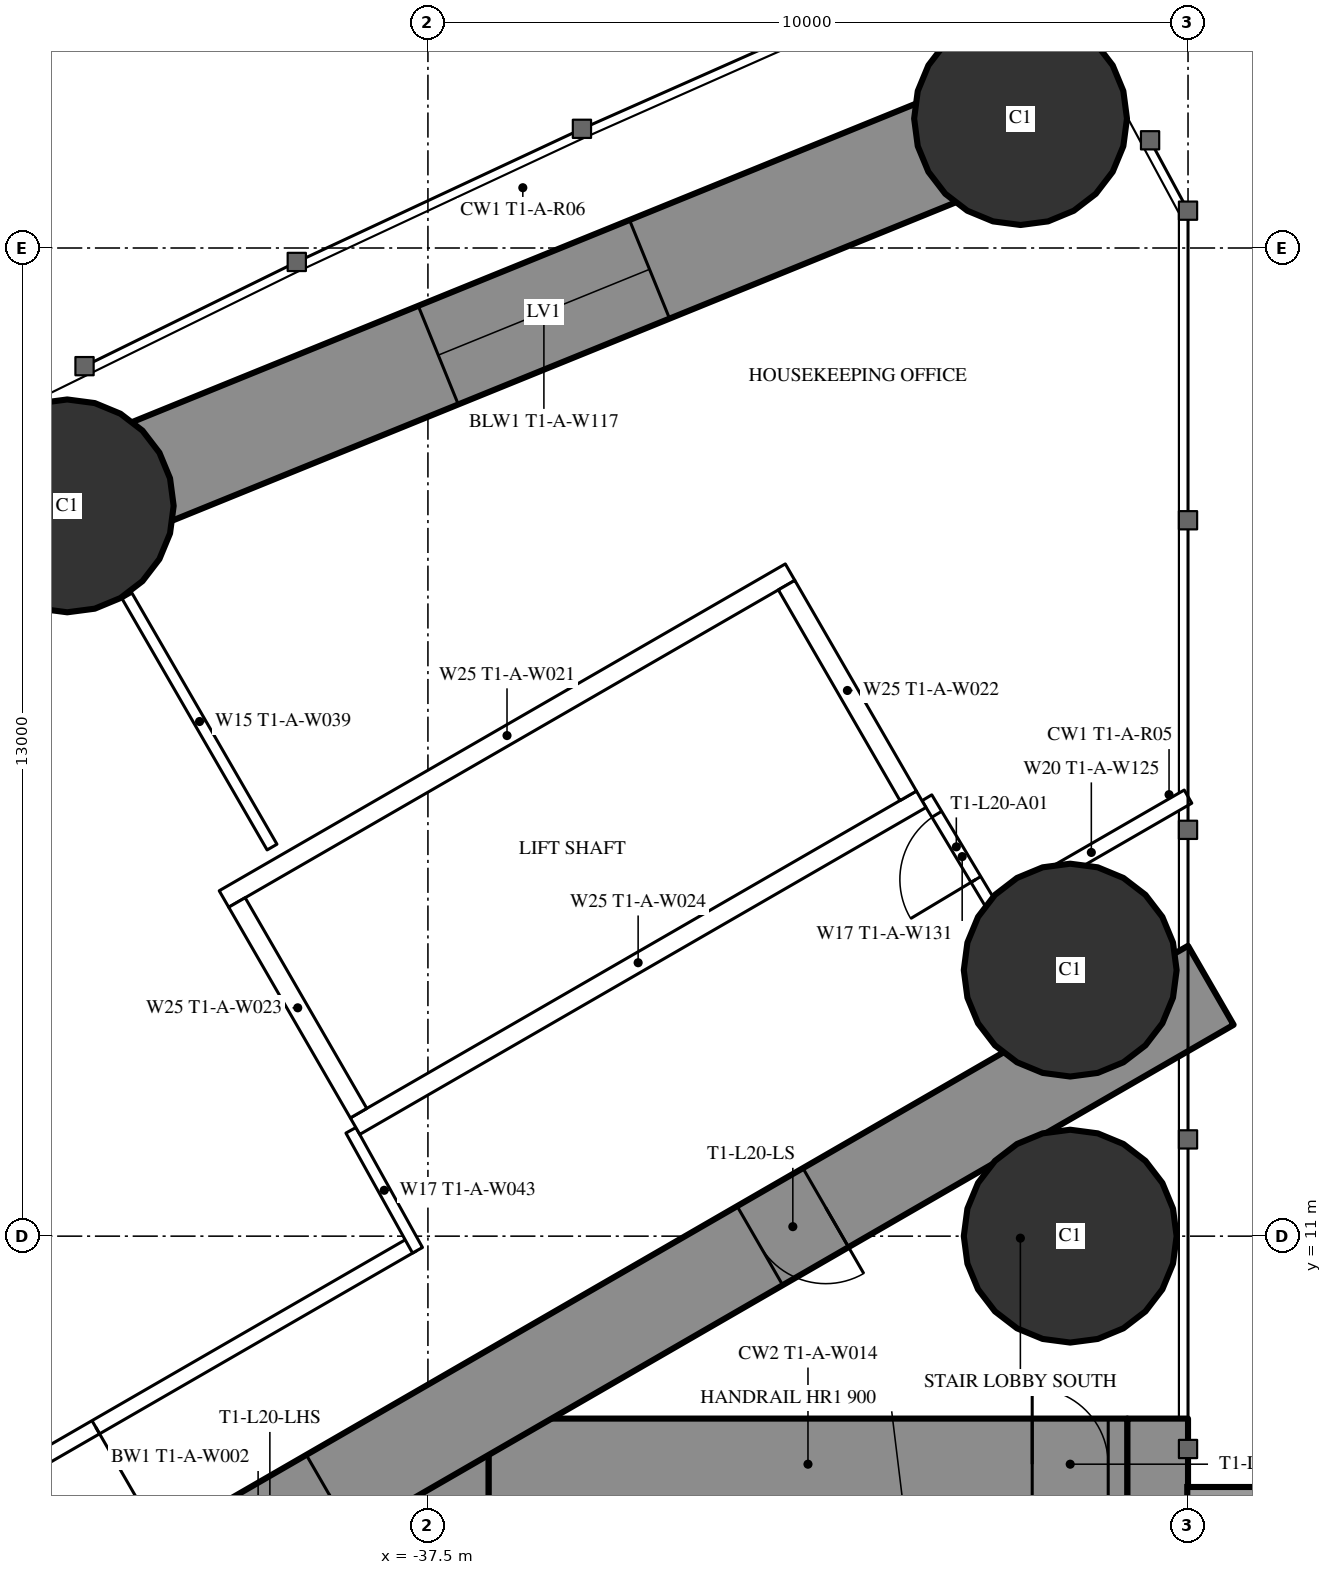
"""IFC4 building model, lengths in metres.
Left out: names, types, materials, properties, quantities, classifications, styles, units other than length and angle.
Written with IfcOpenShell. Run it as: python <this file> out.ifc"""

import sys

from ifc_helpers import new_model, si_unit, direction, frame, frame_2d, origin, origin_2d, place, context, subcontext, project, spatial, rectangle, hollow_circle, extrude, element, fill, save


model = new_model("IFC4")
c1 = context("Model", 3, precision=1e-05, world=origin(), true_north=direction((0.0, 1.0)))
c2 = subcontext(c1, "Body", "Model", "MODEL_VIEW")
j1 = project(units=[si_unit("LENGTHUNIT", "METRE"), si_unit("PLANEANGLEUNIT", "RADIAN")], contexts=[c1])
p1 = place(None, origin())
s1 = spatial("IfcSite", under=j1, at=p1, CompositionType="ELEMENT")
p2 = place(p1, origin())
s2 = spatial("IfcBuilding", under=s1, at=p2, CompositionType="ELEMENT")
p3 = place(p2, frame((0.0, 0.0, 77.5)))
s3 = spatial("IfcBuildingStorey", under=s2, at=p3, CompositionType="ELEMENT", Elevation=77.5)
for number, where, z_axis, x_axis in (
    (1, (-29.703, 25.703, 0.0), (0.0, 0.0, 1.0), (1.0, 0.0, 0.0)),
    (2, (-29.05, 11.0, 0.0), (0.0, 0.0, 1.0), (1.0, 0.0, 0.0)),
    (3, (-29.05, 14.5, 0.0), (0.0, 0.0, 1.0), (1.0, 0.0, 0.0)),
    (4, (-42.245, 20.607, 0.0), (0.0, 0.0, 1.0), (1.0, 0.0, 0.0)),
):
    element("IfcColumn", number, at=place(p3, frame(where, z_axis=z_axis, x_axis=x_axis)), inside=s3, PredefinedType="COLUMN", context=c2, shape_type="SweptSolid", body=[
        extrude(hollow_circle(Radius=1.4, WallThickness=0.12, at=origin_2d()), origin(), (0.0, 0.0, 1.0), 3.5),
    ])
p4 = place(p3, frame((-27.9, 8.6, 0.0), z_axis=(0.0, 0.0, 1.0), x_axis=(0.0, -1.0, 0.0)))
e5 = element("IfcWall", 5, at=p4, inside=s3, PredefinedType="SHEAR", context=c2, shape_type="SweptSolid", body=[
    extrude(rectangle(XDim=17.2, YDim=0.8, at=frame_2d((8.6, 0.0))), origin(), (0.0, 0.0, 1.0), 3.5),
])
p5 = place(p4, frame((2.45, 0.0, 0.6)))
e6 = element("IfcOpeningElement", 6, at=p5, cuts=e5, PredefinedType="OPENING", context=c2, shape_type="SweptSolid", body=[
    extrude(rectangle(XDim=0.6, YDim=2.1, at=frame_2d((0.3, 1.05))), frame((0.0, 0.41, 0.0), z_axis=(0.0, -1.0, 0.0), x_axis=(1.0, 0.0, 0.0)), (0.0, 0.0, 1.0), 0.82),
])
p6 = place(p4, frame((14.15, 0.0, 0.6)))
e7 = element("IfcOpeningElement", 7, at=p6, cuts=e5, PredefinedType="OPENING", context=c2, shape_type="SweptSolid", body=[
    extrude(rectangle(XDim=0.6, YDim=2.1, at=frame_2d((0.3, 1.05))), frame((0.0, 0.41, 0.0), z_axis=(0.0, -1.0, 0.0), x_axis=(1.0, 0.0, 0.0)), (0.0, 0.0, 1.0), 0.82),
])
p7 = place(p3, frame((-37.3, 8.6, 0.0), z_axis=(0.0, 0.0, 1.0), x_axis=(0.0, -1.0, 0.0)))
e8 = element("IfcWall", 8, at=p7, inside=s3, PredefinedType="SHEAR", context=c2, shape_type="SweptSolid", body=[
    extrude(rectangle(XDim=17.2, YDim=1.2, at=frame_2d((8.6, 0.0))), origin(), (0.0, 0.0, 1.0), 3.5),
])
p8 = place(p7, frame((7.7, 0.0, 0.0)))
e9 = element("IfcOpeningElement", 9, at=p8, cuts=e8, PredefinedType="OPENING", context=c2, shape_type="SweptSolid", body=[
    extrude(rectangle(XDim=1.8, YDim=2.2, at=frame_2d((0.9, 1.1))), frame((0.0, 0.61, 0.0), z_axis=(0.0, -1.0, 0.0), x_axis=(1.0, 0.0, 0.0)), (0.0, 0.0, 1.0), 1.22),
])
p9 = place(p3, frame((-28.3, 8.0, 0.0), z_axis=(0.0, 0.0, 1.0), x_axis=(-1.0, 0.0, 0.0)))
e10 = element("IfcWall", 10, at=p9, inside=s3, PredefinedType="SHEAR", context=c2, shape_type="SweptSolid", body=[
    extrude(rectangle(XDim=8.4, YDim=1.2, at=frame_2d((4.2, 0.0))), origin(), (0.0, 0.0, 1.0), 3.5),
])
p10 = place(p9, frame((0.25, 0.0, 0.0)))
e11 = element("IfcOpeningElement", 11, at=p10, cuts=e10, PredefinedType="OPENING", context=c2, shape_type="SweptSolid", body=[
    extrude(rectangle(XDim=1.0, YDim=2.2, at=frame_2d((0.5, 1.1))), frame((0.0, 0.61, 0.0), z_axis=(0.0, -1.0, 0.0), x_axis=(1.0, 0.0, 0.0)), (0.0, 0.0, 1.0), 1.22),
])
p11 = place(p3, frame((-27.2, 14.3, 0.0), z_axis=(0.0, 0.0, 1.0), x_axis=(-0.866026593062, -0.499997940104, 0.0)))
e12 = element("IfcWall", 12, at=p11, inside=s3, PredefinedType="SHEAR", context=c2, shape_type="SweptSolid", body=[
    extrude(rectangle(XDim=28.946, YDim=1.2, at=frame_2d((14.473, 0.0))), origin(), (0.0, 0.0, 1.0), 3.5),
])
p12 = place(p11, frame((5.85, 0.0, 0.0)))
e13 = element("IfcOpeningElement", 13, at=p12, cuts=e12, PredefinedType="OPENING", context=c2, shape_type="SweptSolid", body=[
    extrude(rectangle(XDim=1.0, YDim=2.2, at=frame_2d((0.5, 1.1))), frame((0.0, 0.61, 0.0), z_axis=(0.0, -1.0, 0.0), x_axis=(1.0, 0.0, 0.0)), (0.0, 0.0, 1.0), 1.22),
])
p13 = place(p11, frame((13.395, 0.0, 0.0)))
e14 = element("IfcOpeningElement", 14, at=p13, cuts=e12, PredefinedType="OPENING", context=c2, shape_type="SweptSolid", body=[
    extrude(rectangle(XDim=1.8, YDim=2.04, at=frame_2d((0.9, 1.02))), frame((0.0, 0.61, 0.0), z_axis=(0.0, -1.0, 0.0), x_axis=(1.0, 0.0, 0.0)), (0.0, 0.0, 1.0), 1.22),
])
p14 = place(p3, frame((-29.703, 25.703, 0.0), z_axis=(0.0, 0.0, 1.0), x_axis=(-0.926463236197, -0.376385270667, 0.0)))
e15 = element("IfcWall", 15, at=p14, inside=s3, PredefinedType="SHEAR", context=c2, shape_type="SweptSolid", body=[
    extrude(rectangle(XDim=13.537, YDim=1.4, at=frame_2d((6.769, 0.0))), origin(), (0.0, 0.0, 1.0), 3.5),
])
p15 = place(p14, frame((5.269, 0.0, 0.6)))
e16 = element("IfcOpeningElement", 16, at=p15, cuts=e15, PredefinedType="OPENING", context=c2, shape_type="SweptSolid", body=[
    extrude(rectangle(XDim=3.0, YDim=1.2, at=frame_2d((1.5, 0.6))), frame((0.0, 0.71, 0.0), z_axis=(0.0, -1.0, 0.0), x_axis=(1.0, 0.0, 0.0)), (0.0, 0.0, 1.0), 1.42),
])
p16 = place(p3, frame((-42.245, 20.607, 0.0), z_axis=(0.0, 0.0, 1.0), x_axis=(-0.879692855603, -0.475542300749, 0.0)))
e17 = element("IfcWall", 17, at=p16, inside=s3, PredefinedType="SHEAR", context=c2, shape_type="SweptSolid", body=[
    extrude(rectangle(XDim=12.328, YDim=1.4, at=frame_2d((6.164, 0.0))), origin(), (0.0, 0.0, 1.0), 3.5),
])
p17 = place(p16, frame((4.664, 0.0, 0.6)))
e18 = element("IfcOpeningElement", 18, at=p17, cuts=e17, PredefinedType="OPENING", context=c2, shape_type="SweptSolid", body=[
    extrude(rectangle(XDim=3.0, YDim=1.2, at=frame_2d((1.5, 0.6))), frame((0.0, 0.71, 0.0), z_axis=(0.0, -1.0, 0.0), x_axis=(1.0, 0.0, 0.0)), (0.0, 0.0, 1.0), 1.42),
])
p18 = place(p3, frame((-39.551, 16.119, 0.0), z_axis=(0.0, 0.0, 1.0), x_axis=(-0.500014214979, 0.866017196607, 0.0)))
e19 = element("IfcWall", 19, at=p18, inside=s3, PredefinedType="PARTITIONING", context=c2, shape_type="SweptSolid", body=[
    extrude(rectangle(XDim=3.815, YDim=0.15, at=frame_2d((1.907, 0.0))), origin(), (0.0, 0.0, 1.0), 3.25),
])
p19 = place(p3, frame((-27.5, 16.782, 0.0), z_axis=(0.0, 0.0, 1.0), x_axis=(-0.866045812642, -0.499964649156, 0.0)))
e20 = element("IfcWall", 20, at=p19, inside=s3, PredefinedType="PARTITIONING", context=c2, shape_type="SweptSolid", body=[
    extrude(rectangle(XDim=2.938, YDim=0.2, at=frame_2d((1.469, 0.0))), origin(), (0.0, 0.0, 1.0), 3.25),
])
p20 = place(p3, frame((-37.7, 10.894, 0.0), z_axis=(0.0, 0.0, 1.0), x_axis=(-0.866027905338, -0.499995667157, 0.0)))
e21 = element("IfcWall", 21, at=p20, inside=s3, PredefinedType="PARTITIONING", context=c2, shape_type="SweptSolid", body=[
    extrude(rectangle(XDim=21.787, YDim=0.2, at=frame_2d((10.894, 0.0))), origin(), (0.0, 0.0, 1.0), 3.25),
])
p21 = place(p20, frame((14.644, 0.0, 0.0)))
e22 = element("IfcOpeningElement", 22, at=p21, cuts=e21, PredefinedType="OPENING", context=c2, shape_type="SweptSolid", body=[
    extrude(rectangle(XDim=1.8, YDim=2.2, at=frame_2d((0.9, 1.1))), frame((0.0, 0.11, 0.0), z_axis=(0.0, -1.0, 0.0), x_axis=(1.0, 0.0, 0.0)), (0.0, 0.0, 1.0), 0.22),
])
p22 = place(p20, frame((19.958, 0.0, 0.0)))
e23 = element("IfcOpeningElement", 23, at=p22, cuts=e21, PredefinedType="OPENING", context=c2, shape_type="SweptSolid", body=[
    extrude(rectangle(XDim=1.329, YDim=2.04, at=frame_2d((0.665, 1.02))), frame((0.0, 0.11, 0.0), z_axis=(0.0, -1.0, 0.0), x_axis=(1.0, 0.0, 0.0)), (0.0, 0.0, 1.0), 0.22),
])
p23 = place(p20, frame((4.815, 0.0, 0.0)))
e24 = element("IfcOpeningElement", 24, at=p23, cuts=e21, PredefinedType="OPENING", context=c2, shape_type="SweptSolid", body=[
    extrude(rectangle(XDim=2.0, YDim=2.4, at=frame_2d((1.0, 1.2))), frame((0.0, 0.11, 0.0), z_axis=(0.0, -1.0, 0.0), x_axis=(1.0, 0.0, 0.0)), (0.0, 0.0, 1.0), 0.22),
])
p24 = place(p3, frame((-30.007, 15.219, 0.0), z_axis=(0.0, 0.0, 1.0), x_axis=(-0.514296815006, 0.857612258585, 0.0)))
e25 = element("IfcWall", 25, at=p24, inside=s3, PredefinedType="PARTITIONING", context=c2, shape_type="SweptSolid", body=[
    extrude(rectangle(XDim=1.805, YDim=0.15, at=frame_2d((0.902, 0.0))), origin(), (0.0, 0.0, 1.0), 3.25),
])
p25 = place(p24, frame((0.552, 0.0, 0.0)))
e26 = element("IfcOpeningElement", 26, at=p25, cuts=e25, PredefinedType="OPENING", context=c2, shape_type="SweptSolid", body=[
    extrude(rectangle(XDim=1.0, YDim=2.04, at=frame_2d((0.5, 1.02))), frame((0.0, 0.085, 0.0), z_axis=(0.0, -1.0, 0.0), x_axis=(1.0, 0.0, 0.0)), (0.0, 0.0, 1.0), 0.17),
])
p26 = place(p3, frame((-38.513, 12.392, 0.0), z_axis=(0.0, 0.0, 1.0), x_axis=(0.485585508183, -0.874189175317, 0.0)))
e27 = element("IfcWall", 27, at=p26, inside=s3, PredefinedType="PARTITIONING", context=c2, shape_type="SweptSolid", body=[
    extrude(rectangle(XDim=1.805, YDim=0.15, at=frame_2d((0.902, 0.0))), origin(), (0.0, 0.0, 1.0), 3.25),
])
for number, where, z_axis, x_axis in (
    (28, (-31.01, 16.747, 0.0), (0.0, 0.0, 1.0), (-0.866, -0.5, 0.0)),
    (29, (-32.736, 19.736, 0.0), (0.0, 0.0, 1.0), (-0.866, -0.5, 0.0)),
):
    element("IfcWall", number, at=place(p3, frame(where, z_axis=z_axis, x_axis=x_axis)), inside=s3, PredefinedType="PARTITIONING", context=c2, shape_type="SweptSolid", body=[
        extrude(rectangle(XDim=8.6, YDim=0.25, at=frame_2d((4.3, 0.0))), origin(), (0.0, 0.0, 1.0), 3.25),
    ])
p27 = place(p3, frame((-31.181, 16.793, 0.0), z_axis=(0.0, 0.0, 1.0), x_axis=(-0.499929347863, 0.866066190972, 0.0)))
e30 = element("IfcWall", 30, at=p27, inside=s3, PredefinedType="PARTITIONING", context=c2, shape_type="SweptSolid", body=[
    extrude(rectangle(XDim=3.201, YDim=0.25, at=frame_2d((1.6, 0.0))), origin(), (0.0, 0.0, 1.0), 3.25),
])
p28 = place(p3, frame((-38.413, 12.618, 0.0), z_axis=(0.0, 0.0, 1.0), x_axis=(-0.499872130319, 0.866099216793, 0.0)))
e31 = element("IfcWall", 31, at=p28, inside=s3, PredefinedType="PARTITIONING", context=c2, shape_type="SweptSolid", body=[
    extrude(rectangle(XDim=3.2, YDim=0.25, at=frame_2d((1.6, 0.0))), origin(), (0.0, 0.0, 1.0), 3.25),
])
p29 = place(p15, origin())
e32 = element("IfcWindow", 32, at=p29, inside=s3, PartitioningType="SINGLE_PANEL", PredefinedType="WINDOW", context=c2, shape_type="SweptSolid", body=[
    extrude(rectangle(XDim=3.0, YDim=1.2, at=frame_2d((1.5, 0.6))), frame((0.0, 0.03, 0.0), z_axis=(0.0, -1.0, 0.0), x_axis=(1.0, 0.0, 0.0)), (0.0, 0.0, 1.0), 0.06),
])
fill(e16, e32)
p30 = place(p25, origin())
e33 = element("IfcDoor", 33, at=p30, inside=s3, OperationType="SINGLE_SWING_LEFT", PredefinedType="DOOR", context=c2, shape_type="SweptSolid", body=[
    extrude(rectangle(XDim=1.0, YDim=2.04, at=frame_2d((0.5, 1.02))), frame((0.0, 0.025, 0.0), z_axis=(0.0, -1.0, 0.0), x_axis=(1.0, 0.0, 0.0)), (0.0, 0.0, 1.0), 0.05),
])
fill(e26, e33)
p31 = place(p23, origin())
e34 = element("IfcDoor", 34, at=p31, inside=s3, OperationType="DOUBLE_DOOR_SINGLE_SWING", PredefinedType="DOOR", context=c2, shape_type="SweptSolid", body=[
    extrude(rectangle(XDim=2.0, YDim=2.4, at=frame_2d((1.0, 1.2))), frame((0.0, 0.025, 0.0), z_axis=(0.0, -1.0, 0.0), x_axis=(1.0, 0.0, 0.0)), (0.0, 0.0, 1.0), 0.05),
])
fill(e24, e34)
p32 = place(p12, origin())
e35 = element("IfcDoor", 35, at=p32, inside=s3, OperationType="SINGLE_SWING_LEFT", PredefinedType="DOOR", context=c2, shape_type="SweptSolid", body=[
    extrude(rectangle(XDim=1.0, YDim=2.2, at=frame_2d((0.5, 1.1))), frame((0.0, 0.025, 0.0), z_axis=(0.0, -1.0, 0.0), x_axis=(1.0, 0.0, 0.0)), (0.0, 0.0, 1.0), 0.05),
])
fill(e13, e35)
p33 = place(p13, origin())
e36 = element("IfcDoor", 36, at=p33, inside=s3, OperationType="DOUBLE_DOOR_SINGLE_SWING", PredefinedType="DOOR", context=c2, shape_type="SweptSolid", body=[
    extrude(rectangle(XDim=1.8, YDim=2.04, at=frame_2d((0.9, 1.02))), frame((0.0, 0.025, 0.0), z_axis=(0.0, -1.0, 0.0), x_axis=(1.0, 0.0, 0.0)), (0.0, 0.0, 1.0), 0.05),
])
fill(e14, e36)
p34 = place(p10, origin())
e37 = element("IfcDoor", 37, at=p34, inside=s3, OperationType="SINGLE_SWING_RIGHT", PredefinedType="DOOR", context=c2, shape_type="SweptSolid", body=[
    extrude(rectangle(XDim=1.0, YDim=2.2, at=frame_2d((0.5, 1.1))), frame((0.0, 0.025, 0.0), z_axis=(0.0, -1.0, 0.0), x_axis=(1.0, 0.0, 0.0)), (0.0, 0.0, 1.0), 0.05),
])
fill(e11, e37)
save(model, sys.argv[1])
